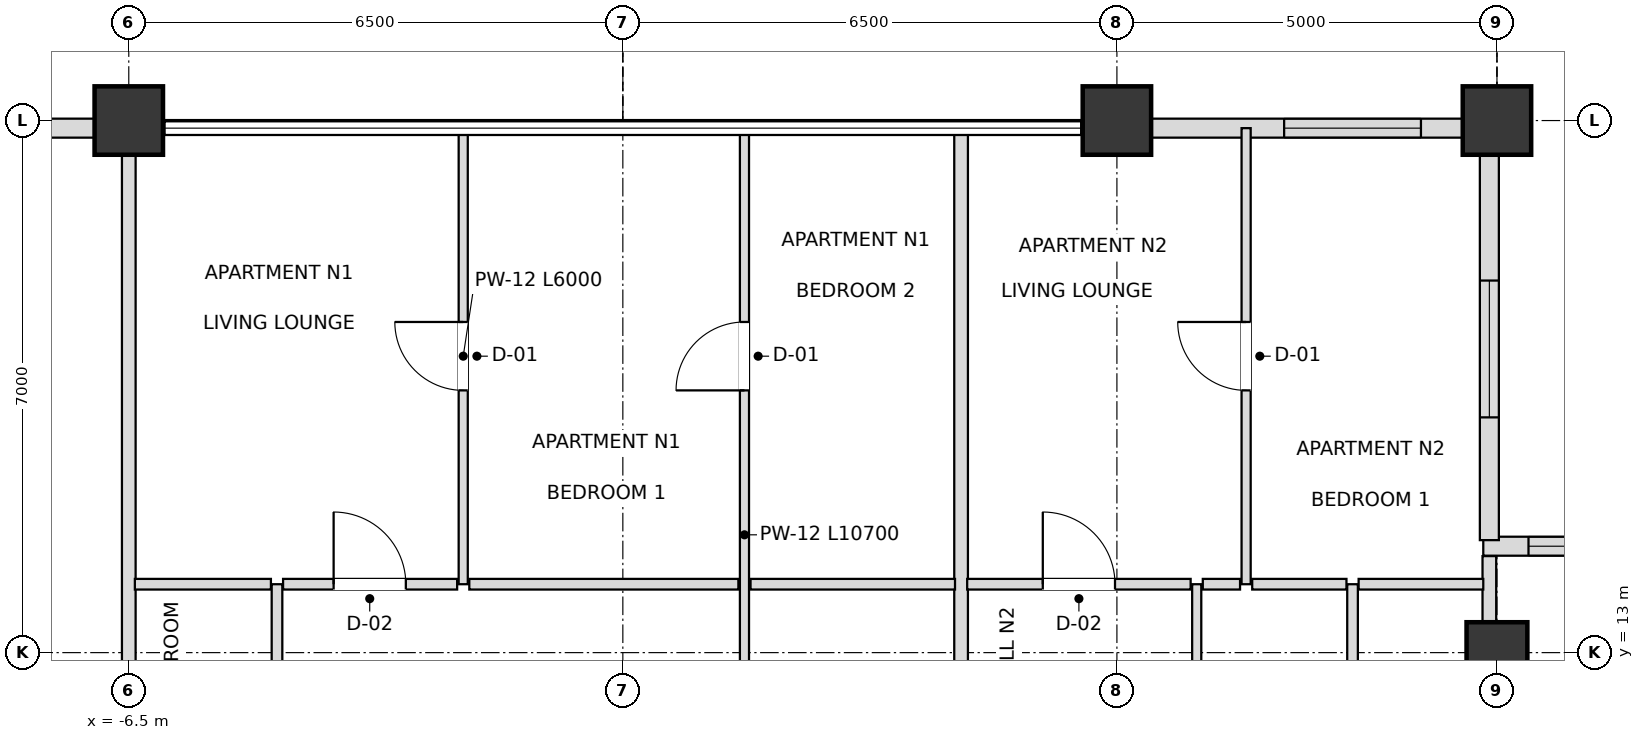
"""IFC4 building model, lengths in metres.
Left out: names, types, materials, properties, quantities, classifications, styles, units other than length and angle.
Written with IfcOpenShell. Run it as: python <this file> out.ifc"""

import sys

from ifc_helpers import new_model, si_unit, direction, frame, frame_2d, origin, origin_2d, place, context, subcontext, project, spatial, rectangle, extrude, element, fill, save


model = new_model("IFC4")
c1 = context("Model", 3, precision=1e-05, world=origin(), true_north=direction((0.0, 1.0)))
c2 = subcontext(c1, "Body", "Model", "MODEL_VIEW")
j1 = project(units=[si_unit("LENGTHUNIT", "METRE"), si_unit("PLANEANGLEUNIT", "RADIAN")], contexts=[c1])
p1 = place(None, origin())
s1 = spatial("IfcSite", under=j1, at=p1, CompositionType="ELEMENT")
p2 = place(p1, origin())
s2 = spatial("IfcBuilding", under=s1, at=p2, CompositionType="ELEMENT")
p3 = place(p2, frame((0.0, 0.0, 251.1)))
s3 = spatial("IfcBuildingStorey", under=s2, at=p3, CompositionType="ELEMENT", Elevation=251.1)
for number, where, z_axis, x_axis in (
    (1, (11.5, 20.0, 0.0), (0.0, 0.0, 1.0), (1.0, 0.0, 0.0)),
    (2, (6.5, 20.0, 0.0), (0.0, 0.0, 1.0), (1.0, 0.0, 0.0)),
    (3, (-6.5, 20.0, 0.0), (0.0, 0.0, 1.0), (1.0, 0.0, 0.0)),
):
    element("IfcColumn", number, at=place(p3, frame(where, z_axis=z_axis, x_axis=x_axis)), inside=s3, PredefinedType="USERDEFINED", context=c2, shape_type="SweptSolid", body=[
        extrude(rectangle(XDim=0.9, YDim=0.9, at=origin_2d()), origin(), (0.0, 0.0, 1.0), 3.6),
    ])
p4 = place(p3, frame((11.5, 13.0, 0.0), z_axis=(0.0, 0.0, 1.0), x_axis=(1.0, 0.0, 0.0)))
e4 = element("IfcColumn", 4, at=p4, inside=s3, PredefinedType="COLUMN", context=c2, shape_type="SweptSolid", body=[
    extrude(rectangle(XDim=0.8, YDim=0.8, at=origin_2d()), origin(), (0.0, 0.0, 1.0), 3.6),
])
p5 = place(p3, frame((11.055, 19.9, 0.0), z_axis=(0.0, 0.0, 1.0), x_axis=(-1.0, 0.0, 0.0)))
e5 = element("IfcWall", 5, at=p5, inside=s3, PredefinedType="SOLIDWALL", context=c2, shape_type="SweptSolid", body=[
    extrude(rectangle(XDim=4.11, YDim=0.25, at=frame_2d((2.055, 0.0))), origin(), (0.0, 0.0, 1.0), 2.748),
])
p6 = place(p5, frame((0.555, 0.0, 0.72)))
e6 = element("IfcOpeningElement", 6, at=p6, cuts=e5, PredefinedType="OPENING", context=c2, shape_type="SweptSolid", body=[
    extrude(rectangle(XDim=1.8, YDim=1.68, at=frame_2d((0.9, 0.84))), frame((0.0, 0.135, 0.0), z_axis=(0.0, -1.0, 0.0), x_axis=(1.0, 0.0, 0.0)), (0.0, 0.0, 1.0), 0.27),
])
p7 = place(p3, frame((-6.945, 19.9, 0.0), z_axis=(0.0, 0.0, 1.0), x_axis=(-1.0, 0.0, 0.0)))
e7 = element("IfcWall", 7, at=p7, inside=s3, PredefinedType="SOLIDWALL", context=c2, shape_type="SweptSolid", body=[
    extrude(rectangle(XDim=4.11, YDim=0.25, at=frame_2d((2.055, 0.0))), origin(), (0.0, 0.0, 1.0), 2.748),
])
p8 = place(p7, frame((1.155, 0.0, 0.72)))
e8 = element("IfcOpeningElement", 8, at=p8, cuts=e7, PredefinedType="OPENING", context=c2, shape_type="SweptSolid", body=[
    extrude(rectangle(XDim=1.8, YDim=1.68, at=frame_2d((0.9, 0.84))), frame((0.0, 0.135, 0.0), z_axis=(0.0, -1.0, 0.0), x_axis=(1.0, 0.0, 0.0)), (0.0, 0.0, 1.0), 0.27),
])
p9 = place(p3, frame((16.98, 14.4, 0.0), z_axis=(0.0, 0.0, 1.0), x_axis=(-1.0, 0.0, 0.0)))
e9 = element("IfcWall", 9, at=p9, inside=s3, PredefinedType="SOLIDWALL", context=c2, shape_type="SweptSolid", body=[
    extrude(rectangle(XDim=5.66, YDim=0.25, at=frame_2d((2.83, 0.0))), origin(), (0.0, 0.0, 1.0), 2.748),
])
p10 = place(p9, frame((0.595, 0.0, 0.72)))
e10 = element("IfcOpeningElement", 10, at=p10, cuts=e9, PredefinedType="OPENING", context=c2, shape_type="SweptSolid", body=[
    extrude(rectangle(XDim=1.8, YDim=1.68, at=frame_2d((0.9, 0.84))), frame((0.0, 0.135, 0.0), z_axis=(0.0, -1.0, 0.0), x_axis=(1.0, 0.0, 0.0)), (0.0, 0.0, 1.0), 0.27),
])
p11 = place(p9, frame((3.265, 0.0, 0.72)))
e11 = element("IfcOpeningElement", 11, at=p11, cuts=e9, PredefinedType="OPENING", context=c2, shape_type="SweptSolid", body=[
    extrude(rectangle(XDim=1.8, YDim=1.68, at=frame_2d((0.9, 0.84))), frame((0.0, 0.135, 0.0), z_axis=(0.0, -1.0, 0.0), x_axis=(1.0, 0.0, 0.0)), (0.0, 0.0, 1.0), 0.27),
])
p12 = place(p3, frame((11.4, 14.48, 0.0), z_axis=(0.0, 0.0, 1.0), x_axis=(0.0, 1.0, 0.0)))
e12 = element("IfcWall", 12, at=p12, inside=s3, PredefinedType="SOLIDWALL", context=c2, shape_type="SweptSolid", body=[
    extrude(rectangle(XDim=5.34, YDim=0.25, at=frame_2d((2.67, 0.0))), origin(), (0.0, 0.0, 1.0), 2.748),
])
p13 = place(p12, frame((1.615, 0.0, 0.72)))
e13 = element("IfcOpeningElement", 13, at=p13, cuts=e12, PredefinedType="OPENING", context=c2, shape_type="SweptSolid", body=[
    extrude(rectangle(XDim=1.8, YDim=1.68, at=frame_2d((0.9, 0.84))), frame((0.0, 0.135, 0.0), z_axis=(0.0, -1.0, 0.0), x_axis=(1.0, 0.0, 0.0)), (0.0, 0.0, 1.0), 0.27),
])
p14 = place(p3, frame((-6.5, 9.2, 0.0), z_axis=(0.0, 0.0, 1.0), x_axis=(0.0, 1.0, 0.0)))
e14 = element("IfcWall", 14, at=p14, inside=s3, PredefinedType="PARTITIONING", context=c2, shape_type="SweptSolid", body=[
    extrude(rectangle(XDim=10.7, YDim=0.18, at=frame_2d((5.35, 0.0))), origin(), (0.0, 0.0, 1.0), 2.826),
])
p15 = place(p3, frame((-4.55, 9.2, 0.0), z_axis=(0.0, 0.0, 1.0), x_axis=(0.0, 1.0, 0.0)))
e15 = element("IfcWall", 15, at=p15, inside=s3, PredefinedType="PARTITIONING", context=c2, shape_type="SweptSolid", body=[
    extrude(rectangle(XDim=4.7, YDim=0.14, at=frame_2d((2.35, 0.0))), origin(), (0.0, 0.0, 1.0), 3.38),
])
p16 = place(p15, frame((1.9, 0.0, 0.0)))
e16 = element("IfcOpeningElement", 16, at=p16, cuts=e15, PredefinedType="OPENING", context=c2, shape_type="SweptSolid", body=[
    extrude(rectangle(XDim=0.9, YDim=2.1, at=frame_2d((0.45, 1.05))), frame((0.0, 0.08, 0.0), z_axis=(0.0, -1.0, 0.0), x_axis=(1.0, 0.0, 0.0)), (0.0, 0.0, 1.0), 0.16),
])
p17 = place(p3, frame((-2.1, 13.9, 0.0), z_axis=(0.0, 0.0, 1.0), x_axis=(0.0, 1.0, 0.0)))
e17 = element("IfcWall", 17, at=p17, inside=s3, PredefinedType="PARTITIONING", context=c2, shape_type="SweptSolid", body=[
    extrude(rectangle(XDim=6.0, YDim=0.12, at=frame_2d((3.0, 0.0))), origin(), (0.0, 0.0, 1.0), 3.018),
])
p18 = place(p17, frame((2.55, 0.0, 0.0)))
e18 = element("IfcOpeningElement", 18, at=p18, cuts=e17, PredefinedType="OPENING", context=c2, shape_type="SweptSolid", body=[
    extrude(rectangle(XDim=0.9, YDim=2.1, at=frame_2d((0.45, 1.05))), frame((0.0, 0.07, 0.0), z_axis=(0.0, -1.0, 0.0), x_axis=(1.0, 0.0, 0.0)), (0.0, 0.0, 1.0), 0.14),
])
p19 = place(p3, frame((1.6, 9.2, 0.0), z_axis=(0.0, 0.0, 1.0), x_axis=(0.0, 1.0, 0.0)))
e19 = element("IfcWall", 19, at=p19, inside=s3, PredefinedType="PARTITIONING", context=c2, shape_type="SweptSolid", body=[
    extrude(rectangle(XDim=10.7, YDim=0.12, at=frame_2d((5.35, 0.0))), origin(), (0.0, 0.0, 1.0), 3.018),
])
p20 = place(p19, frame((1.875, 0.0, 0.0)))
e20 = element("IfcOpeningElement", 20, at=p20, cuts=e19, PredefinedType="OPENING", context=c2, shape_type="SweptSolid", body=[
    extrude(rectangle(XDim=0.95, YDim=2.1, at=frame_2d((0.475, 1.05))), frame((0.0, 0.07, 0.0), z_axis=(0.0, -1.0, 0.0), x_axis=(1.0, 0.0, 0.0)), (0.0, 0.0, 1.0), 0.14),
])
p21 = place(p19, frame((7.25, 0.0, 0.0)))
e21 = element("IfcOpeningElement", 21, at=p21, cuts=e19, PredefinedType="OPENING", context=c2, shape_type="SweptSolid", body=[
    extrude(rectangle(XDim=0.9, YDim=2.1, at=frame_2d((0.45, 1.05))), frame((0.0, 0.07, 0.0), z_axis=(0.0, -1.0, 0.0), x_axis=(1.0, 0.0, 0.0)), (0.0, 0.0, 1.0), 0.14),
])
p22 = place(p3, frame((4.45, 9.2, 0.0), z_axis=(0.0, 0.0, 1.0), x_axis=(0.0, 1.0, 0.0)))
e22 = element("IfcWall", 22, at=p22, inside=s3, PredefinedType="PARTITIONING", context=c2, shape_type="SweptSolid", body=[
    extrude(rectangle(XDim=10.7, YDim=0.18, at=frame_2d((5.35, 0.0))), origin(), (0.0, 0.0, 1.0), 3.018),
])
p23 = place(p3, frame((7.55, 9.2, 0.0), z_axis=(0.0, 0.0, 1.0), x_axis=(0.0, 1.0, 0.0)))
e23 = element("IfcWall", 23, at=p23, inside=s3, PredefinedType="PARTITIONING", context=c2, shape_type="SweptSolid", body=[
    extrude(rectangle(XDim=4.7, YDim=0.12, at=frame_2d((2.35, 0.0))), origin(), (0.0, 0.0, 1.0), 2.826),
])
p24 = place(p23, frame((1.875, 0.0, 0.0)))
e24 = element("IfcOpeningElement", 24, at=p24, cuts=e23, PredefinedType="OPENING", context=c2, shape_type="SweptSolid", body=[
    extrude(rectangle(XDim=0.95, YDim=2.1, at=frame_2d((0.475, 1.05))), frame((0.0, 0.07, 0.0), z_axis=(0.0, -1.0, 0.0), x_axis=(1.0, 0.0, 0.0)), (0.0, 0.0, 1.0), 0.14),
])
p25 = place(p3, frame((8.2, 13.9, 0.0), z_axis=(0.0, 0.0, 1.0), x_axis=(0.0, 1.0, 0.0)))
e25 = element("IfcWall", 25, at=p25, inside=s3, PredefinedType="PARTITIONING", context=c2, shape_type="SweptSolid", body=[
    extrude(rectangle(XDim=6.0, YDim=0.12, at=frame_2d((3.0, 0.0))), origin(), (0.0, 0.0, 1.0), 3.38),
])
p26 = place(p25, frame((2.55, 0.0, 0.0)))
e26 = element("IfcOpeningElement", 26, at=p26, cuts=e25, PredefinedType="OPENING", context=c2, shape_type="SweptSolid", body=[
    extrude(rectangle(XDim=0.9, YDim=2.1, at=frame_2d((0.45, 1.05))), frame((0.0, 0.07, 0.0), z_axis=(0.0, -1.0, 0.0), x_axis=(1.0, 0.0, 0.0)), (0.0, 0.0, 1.0), 0.14),
])
p27 = place(p3, frame((9.6, 9.2, 0.0), z_axis=(0.0, 0.0, 1.0), x_axis=(0.0, 1.0, 0.0)))
e27 = element("IfcWall", 27, at=p27, inside=s3, PredefinedType="PARTITIONING", context=c2, shape_type="SweptSolid", body=[
    extrude(rectangle(XDim=4.7, YDim=0.14, at=frame_2d((2.35, 0.0))), origin(), (0.0, 0.0, 1.0), 2.826),
])
p28 = place(p27, frame((1.9, 0.0, 0.0)))
e28 = element("IfcOpeningElement", 28, at=p28, cuts=e27, PredefinedType="OPENING", context=c2, shape_type="SweptSolid", body=[
    extrude(rectangle(XDim=0.9, YDim=2.1, at=frame_2d((0.45, 1.05))), frame((0.0, 0.08, 0.0), z_axis=(0.0, -1.0, 0.0), x_axis=(1.0, 0.0, 0.0)), (0.0, 0.0, 1.0), 0.16),
])
p29 = place(p3, frame((11.4, 9.2, 0.0), z_axis=(0.0, 0.0, 1.0), x_axis=(0.0, 1.0, 0.0)))
e29 = element("IfcWall", 29, at=p29, inside=s3, PredefinedType="PARTITIONING", context=c2, shape_type="SweptSolid", body=[
    extrude(rectangle(XDim=5.07, YDim=0.18, at=frame_2d((2.535, 0.0))), origin(), (0.0, 0.0, 1.0), 2.748),
])
p30 = place(p3, frame((-6.42, 13.9, 0.0), z_axis=(0.0, 0.0, 1.0), x_axis=(1.0, 0.0, 0.0)))
e30 = element("IfcWall", 30, at=p30, inside=s3, PredefinedType="PARTITIONING", context=c2, shape_type="SweptSolid", body=[
    extrude(rectangle(XDim=1.79, YDim=0.14, at=frame_2d((0.895, 0.0))), origin(), (0.0, 0.0, 1.0), 3.38),
])
p31 = place(p3, frame((-4.47, 13.9, 0.0), z_axis=(0.0, 0.0, 1.0), x_axis=(1.0, 0.0, 0.0)))
e31 = element("IfcWall", 31, at=p31, inside=s3, PredefinedType="PARTITIONING", context=c2, shape_type="SweptSolid", body=[
    extrude(rectangle(XDim=2.29, YDim=0.14, at=frame_2d((1.145, 0.0))), origin(), (0.0, 0.0, 1.0), 3.38),
])
p32 = place(p31, frame((0.665, 0.0, 0.0)))
e32 = element("IfcOpeningElement", 32, at=p32, cuts=e31, PredefinedType="OPENING", context=c2, shape_type="SweptSolid", body=[
    extrude(rectangle(XDim=0.95, YDim=2.1, at=frame_2d((0.475, 1.05))), frame((0.0, 0.08, 0.0), z_axis=(0.0, -1.0, 0.0), x_axis=(1.0, 0.0, 0.0)), (0.0, 0.0, 1.0), 0.16),
])
p33 = place(p3, frame((-2.02, 13.9, 0.0), z_axis=(0.0, 0.0, 1.0), x_axis=(1.0, 0.0, 0.0)))
e33 = element("IfcWall", 33, at=p33, inside=s3, PredefinedType="PARTITIONING", context=c2, shape_type="SweptSolid", body=[
    extrude(rectangle(XDim=3.54, YDim=0.14, at=frame_2d((1.77, 0.0))), origin(), (0.0, 0.0, 1.0), 3.38),
])
p34 = place(p3, frame((1.68, 13.9, 0.0), z_axis=(0.0, 0.0, 1.0), x_axis=(1.0, 0.0, 0.0)))
e34 = element("IfcWall", 34, at=p34, inside=s3, PredefinedType="PARTITIONING", context=c2, shape_type="SweptSolid", body=[
    extrude(rectangle(XDim=2.69, YDim=0.14, at=frame_2d((1.345, 0.0))), origin(), (0.0, 0.0, 1.0), 3.38),
])
p35 = place(p3, frame((4.53, 13.9, 0.0), z_axis=(0.0, 0.0, 1.0), x_axis=(1.0, 0.0, 0.0)))
e35 = element("IfcWall", 35, at=p35, inside=s3, PredefinedType="PARTITIONING", context=c2, shape_type="SweptSolid", body=[
    extrude(rectangle(XDim=2.94, YDim=0.14, at=frame_2d((1.47, 0.0))), origin(), (0.0, 0.0, 1.0), 2.826),
])
p36 = place(p35, frame((0.995, 0.0, 0.0)))
e36 = element("IfcOpeningElement", 36, at=p36, cuts=e35, PredefinedType="OPENING", context=c2, shape_type="SweptSolid", body=[
    extrude(rectangle(XDim=0.95, YDim=2.1, at=frame_2d((0.475, 1.05))), frame((0.0, 0.08, 0.0), z_axis=(0.0, -1.0, 0.0), x_axis=(1.0, 0.0, 0.0)), (0.0, 0.0, 1.0), 0.16),
])
p37 = place(p3, frame((7.63, 13.9, 0.0), z_axis=(0.0, 0.0, 1.0), x_axis=(1.0, 0.0, 0.0)))
e37 = element("IfcWall", 37, at=p37, inside=s3, PredefinedType="PARTITIONING", context=c2, shape_type="SweptSolid", body=[
    extrude(rectangle(XDim=0.49, YDim=0.14, at=frame_2d((0.245, 0.0))), origin(), (0.0, 0.0, 1.0), 3.38),
])
p38 = place(p3, frame((8.28, 13.9, 0.0), z_axis=(0.0, 0.0, 1.0), x_axis=(1.0, 0.0, 0.0)))
e38 = element("IfcWall", 38, at=p38, inside=s3, PredefinedType="PARTITIONING", context=c2, shape_type="SweptSolid", body=[
    extrude(rectangle(XDim=1.24, YDim=0.14, at=frame_2d((0.62, 0.0))), origin(), (0.0, 0.0, 1.0), 3.38),
])
p39 = place(p3, frame((9.68, 13.9, 0.0), z_axis=(0.0, 0.0, 1.0), x_axis=(1.0, 0.0, 0.0)))
e39 = element("IfcWall", 39, at=p39, inside=s3, PredefinedType="PARTITIONING", context=c2, shape_type="SweptSolid", body=[
    extrude(rectangle(XDim=1.64, YDim=0.14, at=frame_2d((0.82, 0.0))), origin(), (0.0, 0.0, 1.0), 3.38),
])
p40 = place(p6, origin())
e40 = element("IfcWindow", 40, at=p40, inside=s3, PartitioningType="SINGLE_PANEL", PredefinedType="WINDOW", context=c2, shape_type="SweptSolid", body=[
    extrude(rectangle(XDim=1.8, YDim=1.68, at=frame_2d((0.9, 0.84))), frame((0.0, 0.03, 0.0), z_axis=(0.0, -1.0, 0.0), x_axis=(1.0, 0.0, 0.0)), (0.0, 0.0, 1.0), 0.06),
])
fill(e6, e40)
p41 = place(p11, origin())
e41 = element("IfcWindow", 41, at=p41, inside=s3, PartitioningType="SINGLE_PANEL", PredefinedType="WINDOW", context=c2, shape_type="SweptSolid", body=[
    extrude(rectangle(XDim=1.8, YDim=1.68, at=frame_2d((0.9, 0.84))), frame((0.0, 0.03, 0.0), z_axis=(0.0, -1.0, 0.0), x_axis=(1.0, 0.0, 0.0)), (0.0, 0.0, 1.0), 0.06),
])
fill(e11, e41)
p42 = place(p13, origin())
e42 = element("IfcWindow", 42, at=p42, inside=s3, PartitioningType="SINGLE_PANEL", PredefinedType="WINDOW", context=c2, shape_type="SweptSolid", body=[
    extrude(rectangle(XDim=1.8, YDim=1.68, at=frame_2d((0.9, 0.84))), frame((0.0, 0.03, 0.0), z_axis=(0.0, -1.0, 0.0), x_axis=(1.0, 0.0, 0.0)), (0.0, 0.0, 1.0), 0.06),
])
fill(e13, e42)
p43 = place(p32, origin())
e43 = element("IfcDoor", 43, at=p43, inside=s3, OperationType="SINGLE_SWING_LEFT", PredefinedType="DOOR", context=c2, shape_type="SweptSolid", body=[
    extrude(rectangle(XDim=0.95, YDim=2.1, at=frame_2d((0.475, 1.05))), frame((0.0, 0.025, 0.0), z_axis=(0.0, -1.0, 0.0), x_axis=(1.0, 0.0, 0.0)), (0.0, 0.0, 1.0), 0.05),
])
fill(e32, e43)
p44 = place(p18, origin())
e44 = element("IfcDoor", 44, at=p44, inside=s3, OperationType="SINGLE_SWING_RIGHT", PredefinedType="DOOR", context=c2, shape_type="SweptSolid", body=[
    extrude(rectangle(XDim=0.9, YDim=2.1, at=frame_2d((0.45, 1.05))), frame((0.0, 0.025, 0.0), z_axis=(0.0, -1.0, 0.0), x_axis=(1.0, 0.0, 0.0)), (0.0, 0.0, 1.0), 0.05),
])
fill(e18, e44)
p45 = place(p21, origin())
e45 = element("IfcDoor", 45, at=p45, inside=s3, OperationType="SINGLE_SWING_LEFT", PredefinedType="DOOR", context=c2, shape_type="SweptSolid", body=[
    extrude(rectangle(XDim=0.9, YDim=2.1, at=frame_2d((0.45, 1.05))), frame((0.0, 0.025, 0.0), z_axis=(0.0, -1.0, 0.0), x_axis=(1.0, 0.0, 0.0)), (0.0, 0.0, 1.0), 0.05),
])
fill(e21, e45)
p46 = place(p36, origin())
e46 = element("IfcDoor", 46, at=p46, inside=s3, OperationType="SINGLE_SWING_LEFT", PredefinedType="DOOR", context=c2, shape_type="SweptSolid", body=[
    extrude(rectangle(XDim=0.95, YDim=2.1, at=frame_2d((0.475, 1.05))), frame((0.0, 0.025, 0.0), z_axis=(0.0, -1.0, 0.0), x_axis=(1.0, 0.0, 0.0)), (0.0, 0.0, 1.0), 0.05),
])
fill(e36, e46)
p47 = place(p26, origin())
e47 = element("IfcDoor", 47, at=p47, inside=s3, OperationType="SINGLE_SWING_RIGHT", PredefinedType="DOOR", context=c2, shape_type="SweptSolid", body=[
    extrude(rectangle(XDim=0.9, YDim=2.1, at=frame_2d((0.45, 1.05))), frame((0.0, 0.025, 0.0), z_axis=(0.0, -1.0, 0.0), x_axis=(1.0, 0.0, 0.0)), (0.0, 0.0, 1.0), 0.05),
])
fill(e26, e47)
save(model, sys.argv[1])
